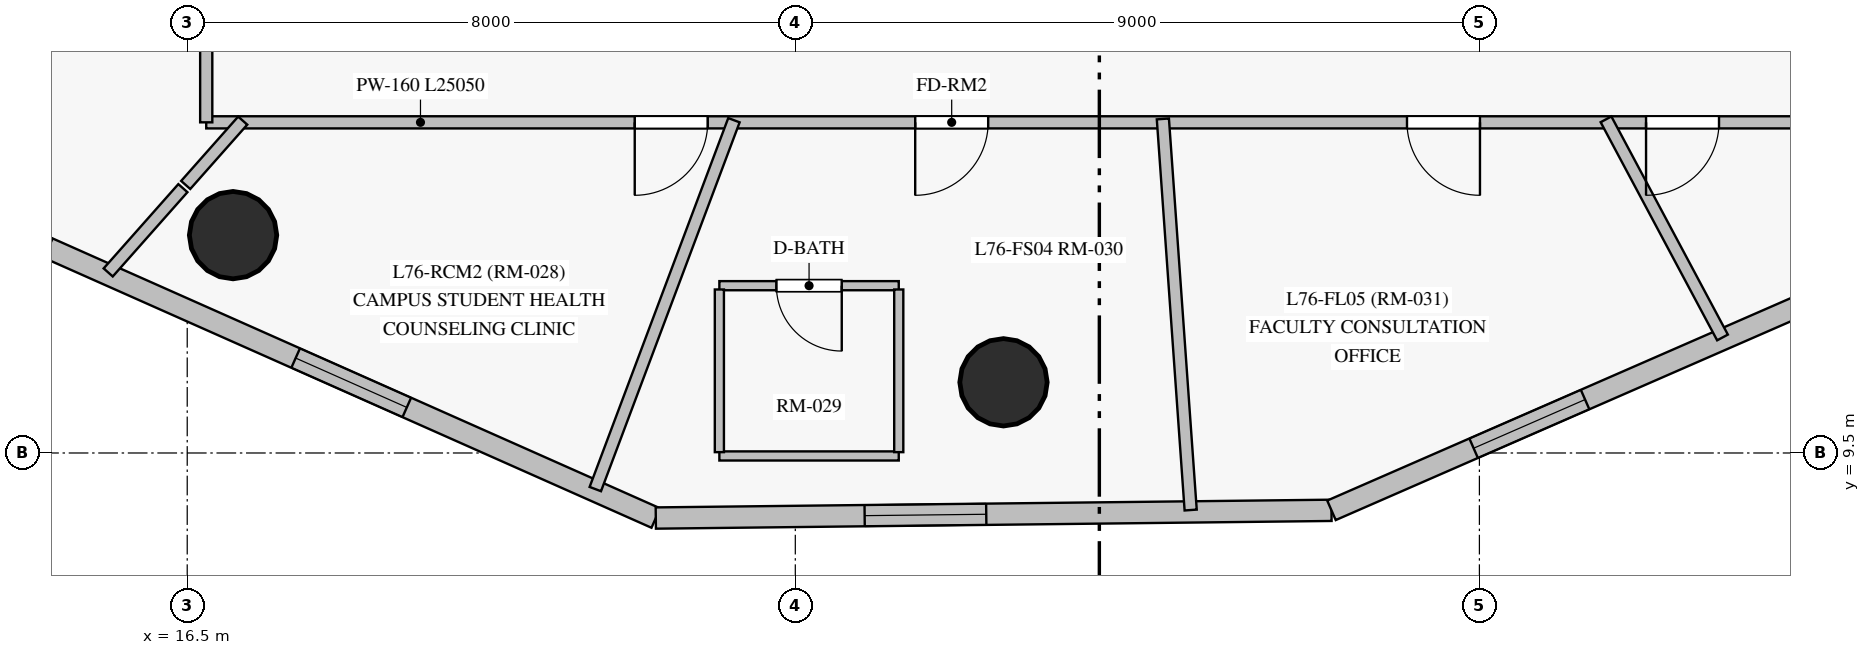
"""IFC4 building model, lengths in metres.
Left out: names, types, materials, properties, quantities, classifications, styles, units other than length and angle.
Written with IfcOpenShell. Run it as: python <this file> out.ifc"""

import sys

from ifc_helpers import new_model, si_unit, direction, frame, frame_2d, origin, origin_with_axes, origin_2d, place, context, subcontext, project, spatial, rectangle, circle, extrude, source, transform, mapped, element, fill, save


model = new_model("IFC4")
c1 = context("Model", 3, precision=1e-05, world=origin(), true_north=direction((0.0, 1.0)))
c2 = subcontext(c1, "Body", "Model", "MODEL_VIEW")
j1 = project(units=[si_unit("LENGTHUNIT", "METRE"), si_unit("PLANEANGLEUNIT", "RADIAN")], contexts=[c1])
p1 = place(None, origin())
s1 = spatial("IfcSite", under=j1, at=p1, CompositionType="ELEMENT")
p2 = place(p1, origin())
s2 = spatial("IfcBuilding", under=s1, at=p2, CompositionType="ELEMENT")
p3 = place(p2, frame((0.0, 0.0, 256.55)))
s3 = spatial("IfcBuildingStorey", under=s2, at=p3, CompositionType="ELEMENT", Elevation=256.55)
m1 = source(origin_with_axes(), c2, "Body", "SweptSolid", [
    extrude(circle(Radius=0.575, at=origin_2d()), origin(), (0.0, 0.0, 1.0), 3.05),
])
for number, where, z_axis, x_axis in (
    (1, (17.103, 12.366, 0.0), (0.0, 0.0, 1.0), (1.0, 0.0, 0.0)),
    (2, (27.239, 10.43, 0.0), (0.0, 0.0, 1.0), (1.0, 0.0, 0.0)),
):
    element("IfcColumn", number, at=place(p3, frame(where, z_axis=z_axis, x_axis=x_axis)), inside=s3, PredefinedType="COLUMN", context=c2, shape_type="MappedRepresentation", body=[
        mapped(m1, transform((0.0, 0.0, 0.0), scale=1.0)),
    ])
p4 = place(p3, frame((12.368, 13.218, 0.0), z_axis=(0.0, 0.0, 1.0), x_axis=(0.913891953807, -0.405957506109, 0.0)))
e3 = element("IfcWall", 3, at=p4, inside=s3, PredefinedType="SOLIDWALL", context=c2, shape_type="SweptSolid", body=[
    extrude(rectangle(XDim=11.267, YDim=0.28, at=frame_2d((5.633, 0.0))), origin(), (0.0, 0.0, 1.0), 2.85),
])
p5 = place(p4, frame((0.921, 0.0, 0.85)))
e4 = element("IfcOpeningElement", 4, at=p5, cuts=e3, PredefinedType="OPENING", context=c2, shape_type="SweptSolid", body=[
    extrude(rectangle(XDim=1.6, YDim=1.6, at=frame_2d((0.8, 0.8))), frame((0.0, 0.15, 0.0), z_axis=(0.0, -1.0, 0.0), x_axis=(1.0, 0.0, 0.0)), (0.0, 0.0, 1.0), 0.3),
])
p6 = place(p4, frame((6.082, 0.0, 0.85)))
e5 = element("IfcOpeningElement", 5, at=p6, cuts=e3, PredefinedType="OPENING", context=c2, shape_type="SweptSolid", body=[
    extrude(rectangle(XDim=1.6, YDim=1.6, at=frame_2d((0.8, 0.8))), frame((0.0, 0.15, 0.0), z_axis=(0.0, -1.0, 0.0), x_axis=(1.0, 0.0, 0.0)), (0.0, 0.0, 1.0), 0.3),
])
p7 = place(p3, frame((22.665, 8.644, 0.0), z_axis=(0.0, 0.0, 1.0), x_axis=(0.999935049496, 0.011397227288, 0.0)))
e6 = element("IfcWall", 6, at=p7, inside=s3, PredefinedType="SOLIDWALL", context=c2, shape_type="SweptSolid", body=[
    extrude(rectangle(XDim=8.89, YDim=0.28, at=frame_2d((4.445, 0.0))), origin(), (0.0, 0.0, 1.0), 2.85),
])
p8 = place(p7, frame((2.748, 0.0, 0.85)))
e7 = element("IfcOpeningElement", 7, at=p8, cuts=e6, PredefinedType="OPENING", context=c2, shape_type="SweptSolid", body=[
    extrude(rectangle(XDim=1.6, YDim=1.6, at=frame_2d((0.8, 0.8))), frame((0.0, 0.15, 0.0), z_axis=(0.0, -1.0, 0.0), x_axis=(1.0, 0.0, 0.0)), (0.0, 0.0, 1.0), 0.3),
])
p9 = place(p3, frame((31.554, 8.746, 0.0), z_axis=(0.0, 0.0, 1.0), x_axis=(0.916405758195, 0.400250529477, 0.0)))
e8 = element("IfcWall", 8, at=p9, inside=s3, PredefinedType="SOLIDWALL", context=c2, shape_type="SweptSolid", body=[
    extrude(rectangle(XDim=12.036, YDim=0.28, at=frame_2d((6.018, 0.0))), origin(), (0.0, 0.0, 1.0), 2.85),
])
p10 = place(p9, frame((2.041, 0.0, 0.85)))
e9 = element("IfcOpeningElement", 9, at=p10, cuts=e8, PredefinedType="OPENING", context=c2, shape_type="SweptSolid", body=[
    extrude(rectangle(XDim=1.6, YDim=1.6, at=frame_2d((0.8, 0.8))), frame((0.0, 0.15, 0.0), z_axis=(0.0, -1.0, 0.0), x_axis=(1.0, 0.0, 0.0)), (0.0, 0.0, 1.0), 0.3),
])
p11 = place(p9, frame((7.999, 0.0, 0.85)))
e10 = element("IfcOpeningElement", 10, at=p11, cuts=e8, PredefinedType="OPENING", context=c2, shape_type="SweptSolid", body=[
    extrude(rectangle(XDim=1.6, YDim=1.6, at=frame_2d((0.8, 0.8))), frame((0.0, 0.15, 0.0), z_axis=(0.0, -1.0, 0.0), x_axis=(1.0, 0.0, 0.0)), (0.0, 0.0, 1.0), 0.3),
])
p12 = place(p3, frame((41.8, 13.85, 0.0), z_axis=(0.0, 0.0, 1.0), x_axis=(-1.0, 0.0, 0.0)))
e11 = element("IfcWall", 11, at=p12, inside=s3, PredefinedType="PARTITIONING", context=c2, shape_type="SweptSolid", body=[
    extrude(rectangle(XDim=25.05, YDim=0.16, at=frame_2d((12.525, 0.0))), origin(), (0.0, 0.0, 1.0), 2.3),
])
p13 = place(p12, frame((14.763, 0.0, 0.0)))
e12 = element("IfcOpeningElement", 12, at=p13, cuts=e11, PredefinedType="OPENING", context=c2, shape_type="SweptSolid", body=[
    extrude(rectangle(XDim=0.96, YDim=2.15, at=frame_2d((0.48, 1.075))), frame((0.0, 0.09, 0.0), z_axis=(0.0, -1.0, 0.0), x_axis=(1.0, 0.0, 0.0)), (0.0, 0.0, 1.0), 0.18),
])
p14 = place(p12, frame((18.452, 0.0, 0.0)))
e13 = element("IfcOpeningElement", 13, at=p14, cuts=e11, PredefinedType="OPENING", context=c2, shape_type="SweptSolid", body=[
    extrude(rectangle(XDim=0.96, YDim=2.15, at=frame_2d((0.48, 1.075))), frame((0.0, 0.09, 0.0), z_axis=(0.0, -1.0, 0.0), x_axis=(1.0, 0.0, 0.0)), (0.0, 0.0, 1.0), 0.18),
])
p15 = place(p12, frame((8.292, 0.0, 0.0)))
e14 = element("IfcOpeningElement", 14, at=p15, cuts=e11, PredefinedType="OPENING", context=c2, shape_type="SweptSolid", body=[
    extrude(rectangle(XDim=0.96, YDim=2.15, at=frame_2d((0.48, 1.075))), frame((0.0, 0.09, 0.0), z_axis=(0.0, -1.0, 0.0), x_axis=(1.0, 0.0, 0.0)), (0.0, 0.0, 1.0), 0.18),
])
p16 = place(p12, frame((5.147, 0.0, 0.0)))
e15 = element("IfcOpeningElement", 15, at=p16, cuts=e11, PredefinedType="OPENING", context=c2, shape_type="SweptSolid", body=[
    extrude(rectangle(XDim=0.96, YDim=2.15, at=frame_2d((0.48, 1.075))), frame((0.0, 0.09, 0.0), z_axis=(0.0, -1.0, 0.0), x_axis=(1.0, 0.0, 0.0)), (0.0, 0.0, 1.0), 0.18),
])
p17 = place(p3, frame((16.75, 13.85, 0.0), z_axis=(0.0, 0.0, 1.0), x_axis=(0.0, 1.0, 0.0)))
e16 = element("IfcWall", 16, at=p17, inside=s3, PredefinedType="PARTITIONING", context=c2, shape_type="SweptSolid", body=[
    extrude(rectangle(XDim=17.8, YDim=0.16, at=frame_2d((8.9, 0.0))), origin(), (0.0, 0.0, 1.0), 2.45),
])
p18 = place(p17, frame((14.492, 0.0, 0.0)))
e17 = element("IfcOpeningElement", 17, at=p18, cuts=e16, PredefinedType="OPENING", context=c2, shape_type="SweptSolid", body=[
    extrude(rectangle(XDim=0.96, YDim=2.15, at=frame_2d((0.48, 1.075))), frame((0.0, 0.09, 0.0), z_axis=(0.0, -1.0, 0.0), x_axis=(1.0, 0.0, 0.0)), (0.0, 0.0, 1.0), 0.18),
])
p19 = place(p17, frame((8.425, 0.0, 0.0)))
e18 = element("IfcOpeningElement", 18, at=p19, cuts=e16, PredefinedType="OPENING", context=c2, shape_type="SweptSolid", body=[
    extrude(rectangle(XDim=0.96, YDim=2.15, at=frame_2d((0.48, 1.075))), frame((0.0, 0.09, 0.0), z_axis=(0.0, -1.0, 0.0), x_axis=(1.0, 0.0, 0.0)), (0.0, 0.0, 1.0), 0.18),
])
p20 = place(p17, frame((5.665, 0.0, 0.0)))
e19 = element("IfcOpeningElement", 19, at=p20, cuts=e16, PredefinedType="OPENING", context=c2, shape_type="SweptSolid", body=[
    extrude(rectangle(XDim=0.96, YDim=2.15, at=frame_2d((0.48, 1.075))), frame((0.0, 0.09, 0.0), z_axis=(0.0, -1.0, 0.0), x_axis=(1.0, 0.0, 0.0)), (0.0, 0.0, 1.0), 0.18),
])
p21 = place(p3, frame((23.693, 13.878, 0.0), z_axis=(0.0, 0.0, 1.0), x_axis=(-0.351773606859, -0.936085108052, 0.0)))
e20 = element("IfcWall", 20, at=p21, inside=s3, PredefinedType="PARTITIONING", context=c2, shape_type="SweptSolid", body=[
    extrude(rectangle(XDim=5.184, YDim=0.16, at=frame_2d((2.592, 0.0))), origin(), (0.0, 0.0, 1.0), 2.85),
])
p22 = place(p3, frame((29.336, 13.895, 0.0), z_axis=(0.0, 0.0, 1.0), x_axis=(0.070897251303, -0.997483623804, 0.0)))
e21 = element("IfcWall", 21, at=p22, inside=s3, PredefinedType="PARTITIONING", context=c2, shape_type="SweptSolid", body=[
    extrude(rectangle(XDim=5.158, YDim=0.16, at=frame_2d((2.579, 0.0))), origin(), (0.0, 0.0, 1.0), 2.85),
])
p23 = place(p3, frame((35.166, 13.89, 0.0), z_axis=(0.0, 0.0, 1.0), x_axis=(0.471094475936, -0.882082759577, 0.0)))
e22 = element("IfcWall", 22, at=p23, inside=s3, PredefinedType="PARTITIONING", context=c2, shape_type="SweptSolid", body=[
    extrude(rectangle(XDim=3.253, YDim=0.16, at=frame_2d((1.627, 0.0))), origin(), (0.0, 0.0, 1.0), 2.85),
])
p24 = place(p3, frame((23.501, 9.461, 0.0), z_axis=(0.0, 0.0, 1.0), x_axis=(1.0, 0.0, 0.0)))
e23 = element("IfcWall", 23, at=p24, inside=s3, PredefinedType="PARTITIONING", context=c2, shape_type="SweptSolid", body=[
    extrude(rectangle(XDim=2.36, YDim=0.12, at=frame_2d((1.18, 0.0))), origin(), (0.0, 0.0, 1.0), 2.85),
])
p25 = place(p3, frame((25.861, 11.701, 0.0), z_axis=(0.0, 0.0, 1.0), x_axis=(-1.0, 0.0, 0.0)))
e24 = element("IfcWall", 24, at=p25, inside=s3, PredefinedType="PARTITIONING", context=c2, shape_type="SweptSolid", body=[
    extrude(rectangle(XDim=2.36, YDim=0.12, at=frame_2d((1.18, 0.0))), origin(), (0.0, 0.0, 1.0), 2.3),
])
p26 = place(p25, frame((0.75, 0.0, 0.0)))
e25 = element("IfcOpeningElement", 25, at=p26, cuts=e24, PredefinedType="OPENING", context=c2, shape_type="SweptSolid", body=[
    extrude(rectangle(XDim=0.86, YDim=2.1, at=frame_2d((0.43, 1.05))), frame((0.0, 0.07, 0.0), z_axis=(0.0, -1.0, 0.0), x_axis=(1.0, 0.0, 0.0)), (0.0, 0.0, 1.0), 0.14),
])
for number, where, z_axis, x_axis in (
    (26, (25.861, 9.511, 0.0), (0.0, 0.0, 1.0), (0.0, 1.0, 0.0)),
    (27, (23.501, 11.651, 0.0), (0.0, 0.0, 1.0), (0.0, -1.0, 0.0)),
):
    element("IfcWall", number, at=place(p3, frame(where, z_axis=z_axis, x_axis=x_axis)), inside=s3, PredefinedType="PARTITIONING", context=c2, shape_type="SweptSolid", body=[
        extrude(rectangle(XDim=2.14, YDim=0.12, at=frame_2d((1.07, 0.0))), origin(), (0.0, 0.0, 1.0), 2.85),
    ])
p27 = place(p3, frame((16.443, 12.984, 0.0), z_axis=(0.0, 0.0, 1.0), x_axis=(-0.663320096345, -0.748335786786, 0.0)))
e28 = element("IfcWall", 28, at=p27, inside=s3, PredefinedType="PARTITIONING", context=c2, shape_type="SweptSolid", body=[
    extrude(rectangle(XDim=1.482, YDim=0.16, at=frame_2d((0.741, 0.0))), origin(), (0.0, 0.0, 1.0), 2.85),
])
p28 = place(p3, frame((17.23, 13.873, 0.0), z_axis=(0.0, 0.0, 1.0), x_axis=(-0.663076715011, -0.748551447805, 0.0)))
e29 = element("IfcWall", 29, at=p28, inside=s3, PredefinedType="PARTITIONING", context=c2, shape_type="SweptSolid", body=[
    extrude(rectangle(XDim=1.131, YDim=0.16, at=frame_2d((0.565, 0.0))), origin(), (0.0, 0.0, 1.0), 2.35),
])
m2 = source(origin_with_axes(), c2, "Body", "SweptSolid", [
    extrude(rectangle(XDim=1.6, YDim=1.6, at=frame_2d((0.8, 0.8))), frame((0.0, 0.03, 0.0), z_axis=(0.0, -1.0, 0.0), x_axis=(1.0, 0.0, 0.0)), (0.0, 0.0, 1.0), 0.06),
])
p29 = place(p6, origin())
e30 = element("IfcWindow", 30, at=p29, inside=s3, PartitioningType="SINGLE_PANEL", PredefinedType="WINDOW", context=c2, shape_type="MappedRepresentation", body=[
    mapped(m2, transform((0.0, 0.0, 0.0), scale=1.0)),
])
fill(e5, e30)
p30 = place(p8, origin())
e31 = element("IfcWindow", 31, at=p30, inside=s3, PartitioningType="SINGLE_PANEL", PredefinedType="WINDOW", context=c2, shape_type="MappedRepresentation", body=[
    mapped(m2, transform((0.0, 0.0, 0.0), scale=1.0)),
])
fill(e7, e31)
p31 = place(p10, origin())
e32 = element("IfcWindow", 32, at=p31, inside=s3, PartitioningType="SINGLE_PANEL", PredefinedType="WINDOW", context=c2, shape_type="MappedRepresentation", body=[
    mapped(m2, transform((0.0, 0.0, 0.0), scale=1.0)),
])
fill(e9, e32)
m3 = source(origin_with_axes(), c2, "Body", "SweptSolid", [
    extrude(rectangle(XDim=0.86, YDim=2.1, at=frame_2d((0.43, 1.05))), frame((0.0, 0.025, 0.0), z_axis=(0.0, -1.0, 0.0), x_axis=(1.0, 0.0, 0.0)), (0.0, 0.0, 1.0), 0.05),
])
p32 = place(p26, origin())
e33 = element("IfcDoor", 33, at=p32, inside=s3, OperationType="SINGLE_SWING_LEFT", PredefinedType="DOOR", context=c2, shape_type="MappedRepresentation", body=[
    mapped(m3, transform((0.0, 0.0, 0.0), scale=1.0)),
])
fill(e25, e33)
m4 = source(origin_with_axes(), c2, "Body", "SweptSolid", [
    extrude(rectangle(XDim=0.96, YDim=2.15, at=frame_2d((0.48, 1.075))), frame((0.0, 0.025, 0.0), z_axis=(0.0, -1.0, 0.0), x_axis=(1.0, 0.0, 0.0)), (0.0, 0.0, 1.0), 0.05),
])
p33 = place(p13, origin())
e34 = element("IfcDoor", 34, at=p33, inside=s3, OperationType="SINGLE_SWING_RIGHT", PredefinedType="DOOR", context=c2, shape_type="MappedRepresentation", body=[
    mapped(m4, transform((0.0, 0.0, 0.0), scale=1.0)),
])
fill(e12, e34)
p34 = place(p14, origin())
e35 = element("IfcDoor", 35, at=p34, inside=s3, OperationType="SINGLE_SWING_RIGHT", PredefinedType="DOOR", context=c2, shape_type="MappedRepresentation", body=[
    mapped(m4, transform((0.0, 0.0, 0.0), scale=1.0)),
])
fill(e13, e35)
p35 = place(p15, origin())
e36 = element("IfcDoor", 36, at=p35, inside=s3, OperationType="SINGLE_SWING_LEFT", PredefinedType="DOOR", context=c2, shape_type="MappedRepresentation", body=[
    mapped(m4, transform((0.0, 0.0, 0.0), scale=1.0)),
])
fill(e14, e36)
p36 = place(p16, origin())
e37 = element("IfcDoor", 37, at=p36, inside=s3, OperationType="SINGLE_SWING_RIGHT", PredefinedType="DOOR", context=c2, shape_type="MappedRepresentation", body=[
    mapped(m4, transform((0.0, 0.0, 0.0), scale=1.0)),
])
fill(e15, e37)
save(model, sys.argv[1])
